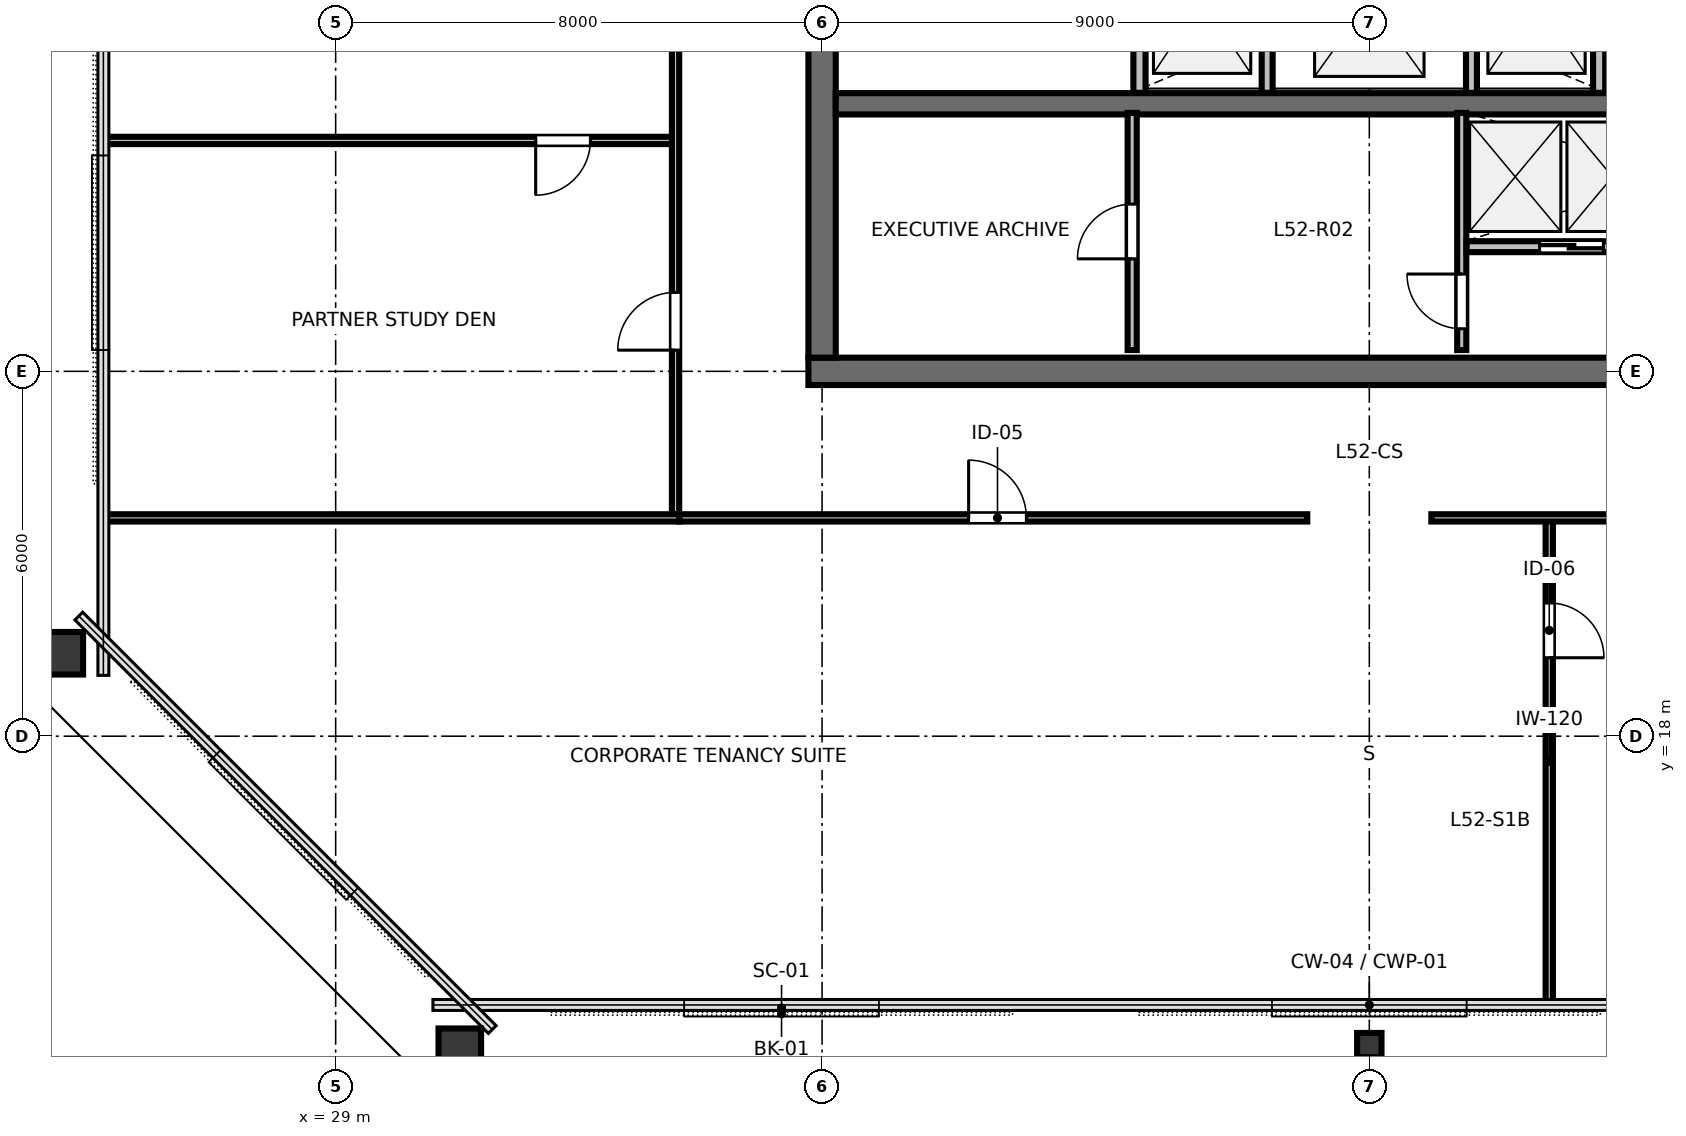
"""IFC4 building model, lengths in metres.
Left out: names, types, materials, properties, quantities, classifications, styles, units other than length and angle.
Written with IfcOpenShell. Run it as: python <this file> out.ifc"""

import sys

from ifc_helpers import new_model, si_unit, direction, frame, frame_2d, origin, origin_2d, place, context, subcontext, project, spatial, rectangle, hollow_rectangle, i_section, extrude, element, fill, save


model = new_model("IFC4")
c1 = context("Model", 3, precision=1e-05, world=origin(), true_north=direction((0.0, 1.0)))
c2 = subcontext(c1, "Body", "Model", "MODEL_VIEW")
j1 = project(units=[si_unit("LENGTHUNIT", "METRE"), si_unit("PLANEANGLEUNIT", "RADIAN")], contexts=[c1])
p1 = place(None, origin())
s1 = spatial("IfcSite", under=j1, at=p1, CompositionType="ELEMENT")
p2 = place(p1, origin())
s2 = spatial("IfcBuilding", under=s1, at=p2, CompositionType="ELEMENT")
p3 = place(p2, frame((0.0, 0.0, 198.6)))
s3 = spatial("IfcBuildingStorey", under=s2, at=p3, CompositionType="ELEMENT", Elevation=198.6)
p4 = place(p3, frame((36.775, 24.0, 0.0), z_axis=(0.0, 0.0, 1.0), x_axis=(1.0, 0.0, 0.0)))
e1 = element("IfcWall", 1, at=p4, inside=s3, PredefinedType="SHEAR", context=c2, shape_type="SweptSolid", body=[
    extrude(rectangle(XDim=18.45, YDim=0.45, at=frame_2d((9.225, 0.0))), origin(), (0.0, 0.0, 1.0), 3.36),
])
p5 = place(p4, frame((13.425, 0.0, 0.0)))
e2 = element("IfcOpeningElement", 2, at=p5, cuts=e1, PredefinedType="OPENING", context=c2, shape_type="SweptSolid", body=[
    extrude(rectangle(XDim=1.6, YDim=2.15, at=frame_2d((0.8, 1.075))), frame((0.0, 0.235, 0.0), z_axis=(0.0, -1.0, 0.0), x_axis=(1.0, 0.0, 0.0)), (0.0, 0.0, 1.0), 0.47),
])
p6 = place(p3, frame((37.0, 24.225, 0.0), z_axis=(0.0, 0.0, 1.0), x_axis=(0.0, 1.0, 0.0)))
e3 = element("IfcWall", 3, at=p6, inside=s3, PredefinedType="SHEAR", context=c2, shape_type="SweptSolid", body=[
    extrude(rectangle(XDim=15.55, YDim=0.45, at=frame_2d((7.775, 0.0))), origin(), (0.0, 0.0, 1.0), 3.36),
])
p7 = place(p6, frame((5.3, 0.0, 0.0)))
e4 = element("IfcOpeningElement", 4, at=p7, cuts=e3, PredefinedType="OPENING", context=c2, shape_type="SweptSolid", body=[
    extrude(rectangle(XDim=1.15, YDim=2.15, at=frame_2d((0.575, 1.075))), frame((0.0, 0.235, 0.0), z_axis=(0.0, -1.0, 0.0), x_axis=(1.0, 0.0, 0.0)), (0.0, 0.0, 1.0), 0.47),
])
p8 = place(p3, frame((37.225, 28.4, 0.0), z_axis=(0.0, 0.0, 1.0), x_axis=(1.0, 0.0, 0.0)))
e5 = element("IfcWall", 5, at=p8, inside=s3, PredefinedType="SHEAR", context=c2, shape_type="SweptSolid", body=[
    extrude(rectangle(XDim=17.55, YDim=0.35, at=frame_2d((8.775, 0.0))), origin(), (0.0, 0.0, 1.0), 3.36),
])
p9 = place(p3, frame((31.042, 12.768, 0.0), z_axis=(0.0, 0.0, 1.0), x_axis=(1.0, 0.0, 0.0)))
e6 = element("IfcColumn", 6, at=p9, inside=s3, PredefinedType="COLUMN", context=c2, shape_type="SweptSolid", body=[
    extrude(hollow_rectangle(XDim=0.7, YDim=0.85, WallThickness=0.04, at=origin_2d()), origin(), (0.0, 0.0, 1.0), 3.373),
])
p10 = place(p3, frame((46.0, 12.92, 0.0), z_axis=(0.0, 0.0, 1.0), x_axis=(1.0, 0.0, 0.0)))
e7 = element("IfcColumn", 7, at=p10, inside=s3, PredefinedType="COLUMN", context=c2, shape_type="SweptSolid", body=[
    extrude(i_section(OverallWidth=0.401, OverallDepth=0.399, WebThickness=0.025, FlangeThickness=0.04, FilletRadius=0.025, at=origin_2d()), origin(), (0.0, 0.0, 1.0), 3.373),
])
p11 = place(p3, frame((24.421, 19.364, 0.0), z_axis=(0.0, 0.0, 1.0), x_axis=(0.0, 1.0, 0.0)))
e8 = element("IfcColumn", 8, at=p11, inside=s3, PredefinedType="COLUMN", context=c2, shape_type="SweptSolid", body=[
    extrude(hollow_rectangle(XDim=0.7, YDim=0.85, WallThickness=0.04, at=origin_2d()), origin(), (0.0, 0.0, 1.0), 3.373),
])
p12 = place(p3, frame((42.22, 28.58, 0.0), z_axis=(0.0, 0.0, 1.0), x_axis=(0.0, 1.0, 0.0)))
e9 = element("IfcWall", 9, at=p12, inside=s3, PredefinedType="PARTITIONING", context=c2, shape_type="SweptSolid", body=[
    extrude(rectangle(XDim=3.04, YDim=0.2, at=frame_2d((1.52, 0.0))), origin(), (0.0, 0.0, 1.0), 3.375),
])
p13 = place(p12, frame((0.95, 0.0, 0.0)))
e10 = element("IfcOpeningElement", 10, at=p13, cuts=e9, PredefinedType="OPENING", context=c2, shape_type="SweptSolid", body=[
    extrude(rectangle(XDim=1.05, YDim=2.15, at=frame_2d((0.525, 1.075))), frame((0.0, 0.11, 0.0), z_axis=(0.0, -1.0, 0.0), x_axis=(1.0, 0.0, 0.0)), (0.0, 0.0, 1.0), 0.22),
])
p14 = place(p3, frame((49.78, 28.58, 0.0), z_axis=(0.0, 0.0, 1.0), x_axis=(0.0, 1.0, 0.0)))
e11 = element("IfcWall", 11, at=p14, inside=s3, PredefinedType="PARTITIONING", context=c2, shape_type="SweptSolid", body=[
    extrude(rectangle(XDim=3.04, YDim=0.2, at=frame_2d((1.52, 0.0))), origin(), (0.0, 0.0, 1.0), 3.375),
])
p15 = place(p14, frame((0.95, 0.0, 0.0)))
e12 = element("IfcOpeningElement", 12, at=p15, cuts=e11, PredefinedType="OPENING", context=c2, shape_type="SweptSolid", body=[
    extrude(rectangle(XDim=1.05, YDim=2.15, at=frame_2d((0.525, 1.075))), frame((0.0, 0.11, 0.0), z_axis=(0.0, -1.0, 0.0), x_axis=(1.0, 0.0, 0.0)), (0.0, 0.0, 1.0), 0.22),
])
for number, where, z_axis, x_axis in (
    (13, (44.32, 28.58, 0.0), (0.0, 0.0, 1.0), (0.0, 1.0, 0.0)),
    (14, (47.68, 28.58, 0.0), (0.0, 0.0, 1.0), (0.0, 1.0, 0.0)),
):
    element("IfcWall", number, at=place(p3, frame(where, z_axis=z_axis, x_axis=x_axis)), inside=s3, PredefinedType="PARTITIONING", context=c2, shape_type="SweptSolid", body=[
        extrude(rectangle(XDim=3.04, YDim=0.18, at=frame_2d((1.52, 0.0))), origin(), (0.0, 0.0, 1.0), 3.375),
    ])
p16 = place(p3, frame((42.1, 24.35, 0.0), z_axis=(0.0, 0.0, 1.0), x_axis=(0.0, 1.0, 0.0)))
e15 = element("IfcWall", 15, at=p16, inside=s3, PredefinedType="PARTITIONING", context=c2, shape_type="SweptSolid", body=[
    extrude(rectangle(XDim=3.9, YDim=0.15, at=frame_2d((1.95, 0.0))), origin(), (0.0, 0.0, 1.0), 3.375),
])
p17 = place(p16, frame((1.5, 0.0, 0.0)))
e16 = element("IfcOpeningElement", 16, at=p17, cuts=e15, PredefinedType="OPENING", context=c2, shape_type="SweptSolid", body=[
    extrude(rectangle(XDim=0.9, YDim=2.15, at=frame_2d((0.45, 1.075))), frame((0.0, 0.085, 0.0), z_axis=(0.0, -1.0, 0.0), x_axis=(1.0, 0.0, 0.0)), (0.0, 0.0, 1.0), 0.17),
])
p18 = place(p3, frame((47.52, 24.35, 0.0), z_axis=(0.0, 0.0, 1.0), x_axis=(0.0, 1.0, 0.0)))
e17 = element("IfcWall", 17, at=p18, inside=s3, PredefinedType="PARTITIONING", context=c2, shape_type="SweptSolid", body=[
    extrude(rectangle(XDim=3.9, YDim=0.15, at=frame_2d((1.95, 0.0))), origin(), (0.0, 0.0, 1.0), 3.375),
])
p19 = place(p18, frame((0.35, 0.0, 0.0)))
e18 = element("IfcOpeningElement", 18, at=p19, cuts=e17, PredefinedType="OPENING", context=c2, shape_type="SweptSolid", body=[
    extrude(rectangle(XDim=0.9, YDim=2.15, at=frame_2d((0.45, 1.075))), frame((0.0, 0.085, 0.0), z_axis=(0.0, -1.0, 0.0), x_axis=(1.0, 0.0, 0.0)), (0.0, 0.0, 1.0), 0.17),
])
p20 = place(p3, frame((47.6, 26.05, 0.0), z_axis=(0.0, 0.0, 1.0), x_axis=(1.0, 0.0, 0.0)))
e19 = element("IfcWall", 19, at=p20, inside=s3, PredefinedType="PARTITIONING", context=c2, shape_type="SweptSolid", body=[
    extrude(rectangle(XDim=7.0, YDim=0.18, at=frame_2d((3.5, 0.0))), origin(), (0.0, 0.0, 1.0), 3.375),
])
p21 = place(p20, frame((1.2, 0.0, 0.0)))
e20 = element("IfcOpeningElement", 20, at=p21, cuts=e19, PredefinedType="OPENING", context=c2, shape_type="SweptSolid", body=[
    extrude(rectangle(XDim=1.05, YDim=2.15, at=frame_2d((0.525, 1.075))), frame((0.0, 0.1, 0.0), z_axis=(0.0, -1.0, 0.0), x_axis=(1.0, 0.0, 0.0)), (0.0, 0.0, 1.0), 0.2),
])
p22 = place(p20, frame((3.4, 0.0, 0.0)))
e21 = element("IfcOpeningElement", 21, at=p22, cuts=e19, PredefinedType="OPENING", context=c2, shape_type="SweptSolid", body=[
    extrude(rectangle(XDim=1.05, YDim=2.15, at=frame_2d((0.525, 1.075))), frame((0.0, 0.1, 0.0), z_axis=(0.0, -1.0, 0.0), x_axis=(1.0, 0.0, 0.0)), (0.0, 0.0, 1.0), 0.2),
])
p23 = place(p3, frame((48.959, 21.59, 0.0), z_axis=(0.0, 0.0, 1.0), x_axis=(0.0, -1.0, 0.0)))
e22 = element("IfcWall", 22, at=p23, inside=s3, PredefinedType="PARTITIONING", context=c2, shape_type="SweptSolid", body=[
    extrude(rectangle(XDim=8.01, YDim=0.12, at=frame_2d((4.005, 0.0))), origin(), (0.0, 0.0, 1.0), 2.655),
])
p24 = place(p23, frame((1.4, 0.0, 0.0)))
e23 = element("IfcOpeningElement", 23, at=p24, cuts=e22, PredefinedType="OPENING", context=c2, shape_type="SweptSolid", body=[
    extrude(rectangle(XDim=0.9, YDim=2.15, at=frame_2d((0.45, 1.075))), frame((0.0, 0.07, 0.0), z_axis=(0.0, -1.0, 0.0), x_axis=(1.0, 0.0, 0.0)), (0.0, 0.0, 1.0), 0.14),
])
p25 = place(p3, frame((34.65, 21.59, 0.0), z_axis=(0.0, 0.0, 1.0), x_axis=(1.0, 0.0, 0.0)))
e24 = element("IfcWall", 24, at=p25, inside=s3, PredefinedType="PARTITIONING", context=c2, shape_type="SweptSolid", body=[
    extrude(rectangle(XDim=10.33, YDim=0.12, at=frame_2d((5.165, 0.0))), origin(), (0.0, 0.0, 1.0), 2.655),
])
p26 = place(p25, frame((4.76, 0.0, 0.0)))
e25 = element("IfcOpeningElement", 25, at=p26, cuts=e24, PredefinedType="OPENING", context=c2, shape_type="SweptSolid", body=[
    extrude(rectangle(XDim=0.95, YDim=2.15, at=frame_2d((0.475, 1.075))), frame((0.0, 0.07, 0.0), z_axis=(0.0, -1.0, 0.0), x_axis=(1.0, 0.0, 0.0)), (0.0, 0.0, 1.0), 0.14),
])
p27 = place(p3, frame((47.02, 21.59, 0.0), z_axis=(0.0, 0.0, 1.0), x_axis=(1.0, 0.0, 0.0)))
e26 = element("IfcWall", 26, at=p27, inside=s3, PredefinedType="PARTITIONING", context=c2, shape_type="SweptSolid", body=[
    extrude(rectangle(XDim=10.33, YDim=0.12, at=frame_2d((5.165, 0.0))), origin(), (0.0, 0.0, 1.0), 2.655),
])
p28 = place(p27, frame((5.59, 0.0, 0.0)))
e27 = element("IfcOpeningElement", 27, at=p28, cuts=e26, PredefinedType="OPENING", context=c2, shape_type="SweptSolid", body=[
    extrude(rectangle(XDim=0.95, YDim=2.15, at=frame_2d((0.475, 1.075))), frame((0.0, 0.07, 0.0), z_axis=(0.0, -1.0, 0.0), x_axis=(1.0, 0.0, 0.0)), (0.0, 0.0, 1.0), 0.14),
])
p29 = place(p3, frame((34.59, 27.797, 0.0), z_axis=(0.0, 0.0, 1.0), x_axis=(-1.0, 0.0, 0.0)))
e28 = element("IfcWall", 28, at=p29, inside=s3, PredefinedType="PARTITIONING", context=c2, shape_type="SweptSolid", body=[
    extrude(rectangle(XDim=9.41, YDim=0.12, at=frame_2d((4.705, 0.0))), origin(), (0.0, 0.0, 1.0), 2.655),
])
p30 = place(p29, frame((1.4, 0.0, 0.0)))
e29 = element("IfcOpeningElement", 29, at=p30, cuts=e28, PredefinedType="OPENING", context=c2, shape_type="SweptSolid", body=[
    extrude(rectangle(XDim=0.9, YDim=2.15, at=frame_2d((0.45, 1.075))), frame((0.0, 0.07, 0.0), z_axis=(0.0, -1.0, 0.0), x_axis=(1.0, 0.0, 0.0)), (0.0, 0.0, 1.0), 0.14),
])
p31 = place(p3, frame((34.59, 21.65, 0.0), z_axis=(0.0, 0.0, 1.0), x_axis=(0.0, 1.0, 0.0)))
e30 = element("IfcWall", 30, at=p31, inside=s3, PredefinedType="PARTITIONING", context=c2, shape_type="SweptSolid", body=[
    extrude(rectangle(XDim=20.7, YDim=0.12, at=frame_2d((10.35, 0.0))), origin(), (0.0, 0.0, 1.0), 2.655),
])
p32 = place(p31, frame((2.698, 0.0, 0.0)))
e31 = element("IfcOpeningElement", 31, at=p32, cuts=e30, PredefinedType="OPENING", context=c2, shape_type="SweptSolid", body=[
    extrude(rectangle(XDim=0.95, YDim=2.15, at=frame_2d((0.475, 1.075))), frame((0.0, 0.07, 0.0), z_axis=(0.0, -1.0, 0.0), x_axis=(1.0, 0.0, 0.0)), (0.0, 0.0, 1.0), 0.14),
])
p33 = place(p31, frame((8.556, 0.0, 0.0)))
e32 = element("IfcOpeningElement", 32, at=p33, cuts=e30, PredefinedType="OPENING", context=c2, shape_type="SweptSolid", body=[
    extrude(rectangle(XDim=0.95, YDim=2.15, at=frame_2d((0.475, 1.075))), frame((0.0, 0.07, 0.0), z_axis=(0.0, -1.0, 0.0), x_axis=(1.0, 0.0, 0.0)), (0.0, 0.0, 1.0), 0.14),
])
p34 = place(p31, frame((15.733, 0.0, 0.0)))
e33 = element("IfcOpeningElement", 33, at=p34, cuts=e30, PredefinedType="OPENING", context=c2, shape_type="SweptSolid", body=[
    extrude(rectangle(XDim=0.95, YDim=2.15, at=frame_2d((0.475, 1.075))), frame((0.0, 0.07, 0.0), z_axis=(0.0, -1.0, 0.0), x_axis=(1.0, 0.0, 0.0)), (0.0, 0.0, 1.0), 0.14),
])
p35 = place(p3, frame((34.65, 21.59, 0.0), z_axis=(0.0, 0.0, 1.0), x_axis=(-1.0, 0.0, 0.0)))
e34 = element("IfcWall", 34, at=p35, inside=s3, PredefinedType="PARTITIONING", context=c2, shape_type="SweptSolid", body=[
    extrude(rectangle(XDim=9.47, YDim=0.12, at=frame_2d((4.735, 0.0))), origin(), (0.0, 0.0, 1.0), 2.655),
])
p36 = place(p17, origin())
e35 = element("IfcDoor", 35, at=p36, inside=s3, OperationType="SINGLE_SWING_LEFT", PredefinedType="DOOR", context=c2, shape_type="SweptSolid", body=[
    extrude(rectangle(XDim=0.9, YDim=2.15, at=frame_2d((0.45, 1.075))), frame((0.0, 0.025, 0.0), z_axis=(0.0, -1.0, 0.0), x_axis=(1.0, 0.0, 0.0)), (0.0, 0.0, 1.0), 0.05),
])
fill(e16, e35)
p37 = place(p19, origin())
e36 = element("IfcDoor", 36, at=p37, inside=s3, OperationType="SINGLE_SWING_RIGHT", PredefinedType="DOOR", context=c2, shape_type="SweptSolid", body=[
    extrude(rectangle(XDim=0.9, YDim=2.15, at=frame_2d((0.45, 1.075))), frame((0.0, 0.025, 0.0), z_axis=(0.0, -1.0, 0.0), x_axis=(1.0, 0.0, 0.0)), (0.0, 0.0, 1.0), 0.05),
])
fill(e18, e36)
p38 = place(p21, origin())
e37 = element("IfcDoor", 37, at=p38, inside=s3, OperationType="SLIDING_TO_LEFT", PredefinedType="DOOR", context=c2, shape_type="SweptSolid", body=[
    extrude(rectangle(XDim=1.05, YDim=2.15, at=frame_2d((0.525, 1.075))), frame((0.0, 0.025, 0.0), z_axis=(0.0, -1.0, 0.0), x_axis=(1.0, 0.0, 0.0)), (0.0, 0.0, 1.0), 0.05),
])
fill(e20, e37)
p39 = place(p24, origin())
e38 = element("IfcDoor", 38, at=p39, inside=s3, OperationType="SINGLE_SWING_RIGHT", PredefinedType="DOOR", context=c2, shape_type="SweptSolid", body=[
    extrude(rectangle(XDim=0.9, YDim=2.15, at=frame_2d((0.45, 1.075))), frame((0.0, 0.025, 0.0), z_axis=(0.0, -1.0, 0.0), x_axis=(1.0, 0.0, 0.0)), (0.0, 0.0, 1.0), 0.05),
])
fill(e23, e38)
p40 = place(p26, origin())
e39 = element("IfcDoor", 39, at=p40, inside=s3, OperationType="SINGLE_SWING_LEFT", PredefinedType="DOOR", context=c2, shape_type="SweptSolid", body=[
    extrude(rectangle(XDim=0.95, YDim=2.15, at=frame_2d((0.475, 1.075))), frame((0.0, 0.025, 0.0), z_axis=(0.0, -1.0, 0.0), x_axis=(1.0, 0.0, 0.0)), (0.0, 0.0, 1.0), 0.05),
])
fill(e25, e39)
p41 = place(p30, origin())
e40 = element("IfcDoor", 40, at=p41, inside=s3, OperationType="SINGLE_SWING_RIGHT", PredefinedType="DOOR", context=c2, shape_type="SweptSolid", body=[
    extrude(rectangle(XDim=0.9, YDim=2.15, at=frame_2d((0.45, 1.075))), frame((0.0, 0.025, 0.0), z_axis=(0.0, -1.0, 0.0), x_axis=(1.0, 0.0, 0.0)), (0.0, 0.0, 1.0), 0.05),
])
fill(e29, e40)
p42 = place(p32, origin())
e41 = element("IfcDoor", 41, at=p42, inside=s3, OperationType="SINGLE_SWING_LEFT", PredefinedType="DOOR", context=c2, shape_type="SweptSolid", body=[
    extrude(rectangle(XDim=0.95, YDim=2.15, at=frame_2d((0.475, 1.075))), frame((0.0, 0.025, 0.0), z_axis=(0.0, -1.0, 0.0), x_axis=(1.0, 0.0, 0.0)), (0.0, 0.0, 1.0), 0.05),
])
fill(e31, e41)
save(model, sys.argv[1])
